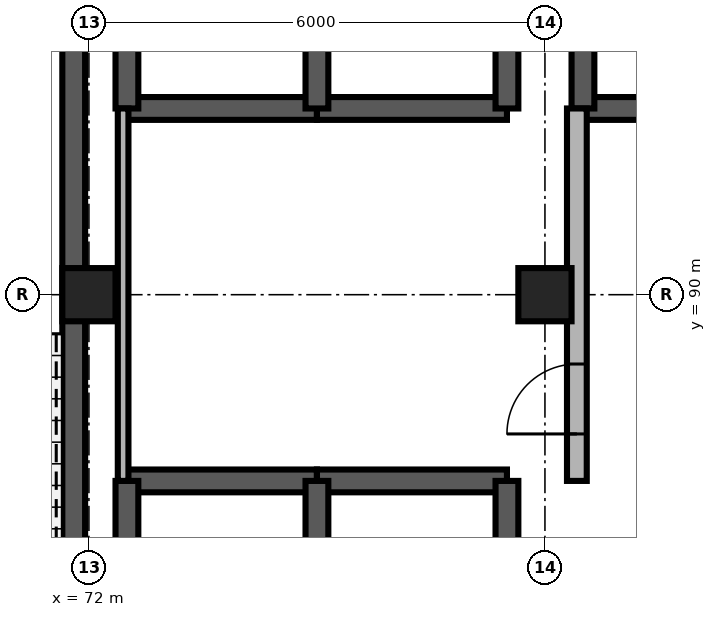
"""IFC4 building model, lengths in metres.
Left out: names, types, materials, properties, quantities, classifications, styles, units other than length and angle.
Written with IfcOpenShell. Run it as: python <this file> out.ifc"""

import sys

from ifc_helpers import new_model, si_unit, direction, frame, frame_2d, origin, origin_2d, place, context, subcontext, project, spatial, rectangle, extrude, element, fill, save


model = new_model("IFC4")
c1 = context("Model", 3, precision=1e-05, world=origin(), true_north=direction((0.0, 1.0)))
c2 = subcontext(c1, "Body", "Model", "MODEL_VIEW")
j1 = project(units=[si_unit("LENGTHUNIT", "METRE"), si_unit("PLANEANGLEUNIT", "RADIAN")], contexts=[c1])
p1 = place(None, origin())
s1 = spatial("IfcSite", under=j1, at=p1, CompositionType="ELEMENT")
p2 = place(p1, origin())
s2 = spatial("IfcBuilding", under=s1, at=p2, CompositionType="ELEMENT")
p3 = place(p2, frame((0.0, 0.0, 56.1)))
s3 = spatial("IfcBuildingStorey", under=s2, at=p3, CompositionType="ELEMENT", Elevation=56.1)
for number, where, z_axis, x_axis in (
    (1, (72.0, 90.0, 0.0), (0.0, 0.0, 1.0), (1.0, 0.0, 0.0)),
    (2, (78.0, 90.0, 0.0), (0.0, 0.0, 1.0), (1.0, 0.0, 0.0)),
):
    element("IfcColumn", number, at=place(p3, frame(where, z_axis=z_axis, x_axis=x_axis)), inside=s3, PredefinedType="COLUMN", context=c2, shape_type="SweptSolid", body=[
        extrude(rectangle(XDim=0.7, YDim=0.7, at=origin_2d()), origin(), (0.0, 0.0, 1.0), 3.9),
    ])
p4 = place(p3, frame((71.8, 84.0, 0.0), z_axis=(0.0, 0.0, 1.0), x_axis=(0.0, 1.0, 0.0)))
e3 = element("IfcWall", 3, at=p4, inside=s3, PredefinedType="SHEAR", context=c2, shape_type="SweptSolid", body=[
    extrude(rectangle(XDim=11.8, YDim=0.3, at=frame_2d((5.9, 0.0))), origin(), (0.0, 0.0, 1.0), 3.74),
])
p5 = place(p3, frame((72.5, 87.55, 0.0), z_axis=(0.0, 0.0, 1.0), x_axis=(1.0, 0.0, 0.0)))
e4 = element("IfcWall", 4, at=p5, inside=s3, PredefinedType="SHEAR", context=c2, shape_type="SweptSolid", body=[
    extrude(rectangle(XDim=2.5, YDim=0.3, at=frame_2d((1.25, 0.0))), origin(), (0.0, 0.0, 1.0), 3.74),
])
p6 = place(p3, frame((72.5, 84.15, 0.0), z_axis=(0.0, 0.0, 1.0), x_axis=(0.0, 1.0, 0.0)))
e5 = element("IfcWall", 5, at=p6, inside=s3, PredefinedType="SHEAR", context=c2, shape_type="SweptSolid", body=[
    extrude(rectangle(XDim=3.4, YDim=0.3, at=frame_2d((1.7, 0.0))), origin(), (0.0, 0.0, 1.0), 3.74),
])
p7 = place(p3, frame((75.0, 87.55, 0.0), z_axis=(0.0, 0.0, 1.0), x_axis=(1.0, 0.0, 0.0)))
e6 = element("IfcWall", 6, at=p7, inside=s3, PredefinedType="SHEAR", context=c2, shape_type="SweptSolid", body=[
    extrude(rectangle(XDim=2.5, YDim=0.3, at=frame_2d((1.25, 0.0))), origin(), (0.0, 0.0, 1.0), 3.74),
])
for number, where, z_axis, x_axis in (
    (7, (75.0, 84.15, 0.0), (0.0, 0.0, 1.0), (0.0, 1.0, 0.0)),
    (8, (77.5, 84.15, 0.0), (0.0, 0.0, 1.0), (0.0, 1.0, 0.0)),
):
    element("IfcWall", number, at=place(p3, frame(where, z_axis=z_axis, x_axis=x_axis)), inside=s3, PredefinedType="SHEAR", context=c2, shape_type="SweptSolid", body=[
        extrude(rectangle(XDim=3.4, YDim=0.3, at=frame_2d((1.7, 0.0))), origin(), (0.0, 0.0, 1.0), 3.74),
    ])
p8 = place(p3, frame((72.5, 92.45, 0.0), z_axis=(0.0, 0.0, 1.0), x_axis=(1.0, 0.0, 0.0)))
e9 = element("IfcWall", 9, at=p8, inside=s3, PredefinedType="SHEAR", context=c2, shape_type="SweptSolid", body=[
    extrude(rectangle(XDim=2.5, YDim=0.3, at=frame_2d((1.25, 0.0))), origin(), (0.0, 0.0, 1.0), 3.74),
])
p9 = place(p3, frame((72.5, 92.45, 0.0), z_axis=(0.0, 0.0, 1.0), x_axis=(0.0, 1.0, 0.0)))
e10 = element("IfcWall", 10, at=p9, inside=s3, PredefinedType="SHEAR", context=c2, shape_type="SweptSolid", body=[
    extrude(rectangle(XDim=3.4, YDim=0.3, at=frame_2d((1.7, 0.0))), origin(), (0.0, 0.0, 1.0), 3.74),
])
p10 = place(p3, frame((75.0, 92.45, 0.0), z_axis=(0.0, 0.0, 1.0), x_axis=(1.0, 0.0, 0.0)))
e11 = element("IfcWall", 11, at=p10, inside=s3, PredefinedType="SHEAR", context=c2, shape_type="SweptSolid", body=[
    extrude(rectangle(XDim=2.5, YDim=0.3, at=frame_2d((1.25, 0.0))), origin(), (0.0, 0.0, 1.0), 3.74),
])
for number, where, z_axis, x_axis in (
    (12, (75.0, 92.45, 0.0), (0.0, 0.0, 1.0), (0.0, 1.0, 0.0)),
    (13, (77.5, 92.45, 0.0), (0.0, 0.0, 1.0), (0.0, 1.0, 0.0)),
):
    element("IfcWall", number, at=place(p3, frame(where, z_axis=z_axis, x_axis=x_axis)), inside=s3, PredefinedType="SHEAR", context=c2, shape_type="SweptSolid", body=[
        extrude(rectangle(XDim=3.4, YDim=0.3, at=frame_2d((1.7, 0.0))), origin(), (0.0, 0.0, 1.0), 3.74),
    ])
p11 = place(p3, frame((78.5, 92.45, 0.0), z_axis=(0.0, 0.0, 1.0), x_axis=(1.0, 0.0, 0.0)))
e14 = element("IfcWall", 14, at=p11, inside=s3, PredefinedType="SHEAR", context=c2, shape_type="SweptSolid", body=[
    extrude(rectangle(XDim=2.5, YDim=0.3, at=frame_2d((1.25, 0.0))), origin(), (0.0, 0.0, 1.0), 3.74),
])
p12 = place(p3, frame((78.5, 92.45, 0.0), z_axis=(0.0, 0.0, 1.0), x_axis=(0.0, 1.0, 0.0)))
e15 = element("IfcWall", 15, at=p12, inside=s3, PredefinedType="SHEAR", context=c2, shape_type="SweptSolid", body=[
    extrude(rectangle(XDim=3.4, YDim=0.3, at=frame_2d((1.7, 0.0))), origin(), (0.0, 0.0, 1.0), 3.74),
])
p13 = place(p3, frame((78.42, 87.55, 0.0), z_axis=(0.0, 0.0, 1.0), x_axis=(0.0, 1.0, 0.0)))
e16 = element("IfcWall", 16, at=p13, inside=s3, PredefinedType="PARTITIONING", context=c2, shape_type="SweptSolid", body=[
    extrude(rectangle(XDim=4.9, YDim=0.26, at=frame_2d((2.45, 0.0))), origin(), (0.0, 0.0, 1.0), 3.74),
])
p14 = place(p13, frame((0.618, 0.0, 0.0)))
e17 = element("IfcOpeningElement", 17, at=p14, cuts=e16, PredefinedType="OPENING", context=c2, shape_type="SweptSolid", body=[
    extrude(rectangle(XDim=0.92, YDim=2.15, at=frame_2d((0.46, 1.075))), frame((0.0, 0.145, 0.0), z_axis=(0.0, -1.0, 0.0), x_axis=(1.0, 0.0, 0.0)), (0.0, 0.0, 1.0), 0.29),
])
p15 = place(p3, frame((72.45, 87.55, 0.0), z_axis=(0.0, 0.0, 1.0), x_axis=(0.0, 1.0, 0.0)))
e18 = element("IfcWall", 18, at=p15, inside=s3, PredefinedType="PARTITIONING", context=c2, shape_type="SweptSolid", body=[
    extrude(rectangle(XDim=4.9, YDim=0.14, at=frame_2d((2.45, 0.0))), origin(), (0.0, 0.0, 1.0), 3.74),
])
p16 = place(p14, origin())
e19 = element("IfcDoor", 19, at=p16, inside=s3, OperationType="SINGLE_SWING_LEFT", PredefinedType="DOOR", context=c2, shape_type="SweptSolid", body=[
    extrude(rectangle(XDim=0.92, YDim=2.15, at=frame_2d((0.46, 1.075))), frame((0.0, 0.025, 0.0), z_axis=(0.0, -1.0, 0.0), x_axis=(1.0, 0.0, 0.0)), (0.0, 0.0, 1.0), 0.05),
])
fill(e17, e19)
save(model, sys.argv[1])
